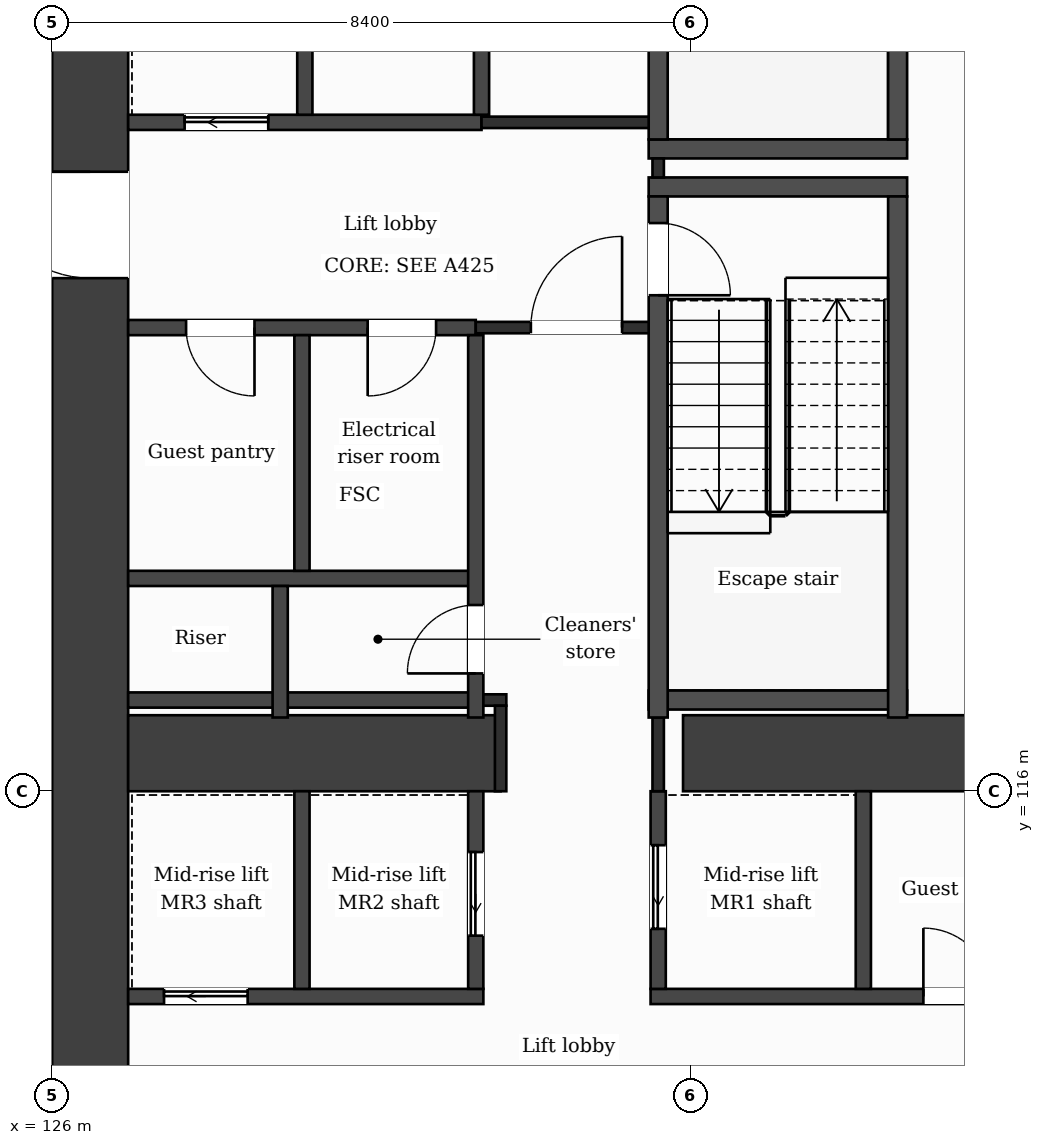
"""IFC4 building model, lengths in metres.
Left out: names, types, materials, properties, quantities, classifications, styles, units other than length and angle.
Written with IfcOpenShell. Run it as: python <this file> out.ifc"""

import sys

from ifc_helpers import new_model, si_unit, direction, frame, frame_2d, origin, place, context, subcontext, project, spatial, rectangle, extrude, element, fill, save


model = new_model("IFC4")
c1 = context("Model", 3, precision=1e-05, world=origin(), true_north=direction((0.0, 1.0)))
c2 = subcontext(c1, "Body", "Model", "MODEL_VIEW")
j1 = project(units=[si_unit("LENGTHUNIT", "METRE"), si_unit("PLANEANGLEUNIT", "RADIAN")], contexts=[c1])
p1 = place(None, origin())
s1 = spatial("IfcSite", under=j1, at=p1, CompositionType="ELEMENT")
p2 = place(p1, origin())
s2 = spatial("IfcBuilding", under=s1, at=p2, CompositionType="ELEMENT")
p3 = place(p2, frame((0.0, 0.0, 105.8)))
s3 = spatial("IfcBuildingStorey", under=s2, at=p3, CompositionType="ELEMENT", Elevation=105.8)
p4 = place(p3, frame((137.732, 131.9, 0.0), z_axis=(0.0, 0.0, 1.0), x_axis=(0.133411141623, -0.991060778808, 0.0)))
e1 = element("IfcWall", 1, at=p4, inside=s3, PredefinedType="SHEAR", context=c2, shape_type="SweptSolid", body=[
    extrude(rectangle(XDim=21.189, YDim=1.0, at=frame_2d((10.595, 0.0))), origin(), (0.0, 0.0, 1.0), 3.7),
])
p5 = place(p3, frame((126.5, 110.9, 0.0), z_axis=(0.0, 0.0, 1.0), x_axis=(0.0, 1.0, 0.0)))
e2 = element("IfcWall", 2, at=p5, inside=s3, PredefinedType="SHEAR", context=c2, shape_type="SweptSolid", body=[
    extrude(rectangle(XDim=21.0, YDim=1.0, at=frame_2d((10.5, 0.0))), origin(), (0.0, 0.0, 1.0), 3.7),
])
p6 = place(p5, frame((11.85, 0.0, 0.0)))
e3 = element("IfcOpeningElement", 3, at=p6, cuts=e2, PredefinedType="OPENING", context=c2, shape_type="SweptSolid", body=[
    extrude(rectangle(XDim=1.4, YDim=2.1, at=frame_2d((0.7, 1.05))), frame((0.0, 0.51, 0.0), z_axis=(0.0, -1.0, 0.0), x_axis=(1.0, 0.0, 0.0)), (0.0, 0.0, 1.0), 1.02),
])
p7 = place(p3, frame((127.0, 116.5, 0.0), z_axis=(0.0, 0.0, 1.0), x_axis=(1.0, 0.0, 0.0)))
e4 = element("IfcWall", 4, at=p7, inside=s3, PredefinedType="SHEAR", context=c2, shape_type="SweptSolid", body=[
    extrude(rectangle(XDim=4.9, YDim=1.0, at=frame_2d((2.45, 0.0))), origin(), (0.0, 0.0, 1.0), 3.7),
])
p8 = place(p3, frame((134.3, 116.5, 0.0), z_axis=(0.0, 0.0, 1.0), x_axis=(1.0, 0.0, 0.0)))
e5 = element("IfcWall", 5, at=p8, inside=s3, PredefinedType="SHEAR", context=c2, shape_type="SweptSolid", body=[
    extrude(rectangle(XDim=5.077, YDim=1.0, at=frame_2d((2.539, 0.0))), origin(), (0.0, 0.0, 1.0), 3.7),
])
p9 = place(p3, frame((127.0, 113.3, 0.0), z_axis=(0.0, 0.0, 1.0), x_axis=(1.0, 0.0, 0.0)))
e6 = element("IfcWall", 6, at=p9, inside=s3, PredefinedType="PARTITIONING", context=c2, shape_type="SweptSolid", body=[
    extrude(rectangle(XDim=4.673, YDim=0.2, at=frame_2d((2.336, 0.0))), origin(), (0.0, 0.0, 1.0), 3.38),
])
p10 = place(p9, frame((0.472, 0.0, 0.0)))
e7 = element("IfcOpeningElement", 7, at=p10, cuts=e6, PredefinedType="OPENING", context=c2, shape_type="SweptSolid", body=[
    extrude(rectangle(XDim=1.1, YDim=2.1, at=frame_2d((0.55, 1.05))), frame((0.0, 0.11, 0.0), z_axis=(0.0, -1.0, 0.0), x_axis=(1.0, 0.0, 0.0)), (0.0, 0.0, 1.0), 0.22),
])
p11 = place(p3, frame((133.873, 113.3, 0.0), z_axis=(0.0, 0.0, 1.0), x_axis=(1.0, 0.0, 0.0)))
e8 = element("IfcWall", 8, at=p11, inside=s3, PredefinedType="PARTITIONING", context=c2, shape_type="SweptSolid", body=[
    extrude(rectangle(XDim=5.888, YDim=0.2, at=frame_2d((2.944, 0.0))), origin(), (0.0, 0.0, 1.0), 3.38),
])
p12 = place(p11, frame((3.589, 0.0, 0.0)))
e9 = element("IfcOpeningElement", 9, at=p12, cuts=e8, PredefinedType="OPENING", context=c2, shape_type="SweptSolid", body=[
    extrude(rectangle(XDim=0.9, YDim=2.1, at=frame_2d((0.45, 1.05))), frame((0.0, 0.11, 0.0), z_axis=(0.0, -1.0, 0.0), x_axis=(1.0, 0.0, 0.0)), (0.0, 0.0, 1.0), 0.22),
])
p13 = place(p3, frame((127.0, 117.2, 0.0), z_axis=(0.0, 0.0, 1.0), x_axis=(1.0, 0.0, 0.0)))
e10 = element("IfcWall", 10, at=p13, inside=s3, PredefinedType="PARTITIONING", context=c2, shape_type="SweptSolid", body=[
    extrude(rectangle(XDim=4.573, YDim=0.2, at=frame_2d((2.287, 0.0))), origin(), (0.0, 0.0, 1.0), 3.38),
])
p14 = place(p3, frame((131.573, 117.2, 0.0), z_axis=(0.0, 0.0, 1.0), x_axis=(1.0, 0.0, 0.0)))
e11 = element("IfcWall", 11, at=p14, inside=s3, PredefinedType="PARTITIONING", context=c2, shape_type="SweptSolid", body=[
    extrude(rectangle(XDim=0.402, YDim=0.15, at=frame_2d((0.201, 0.0))), origin(), (0.0, 0.0, 1.0), 3.38),
])
p15 = place(p3, frame((133.848, 117.2, 0.0), z_axis=(0.0, 0.0, 1.0), x_axis=(1.0, 0.0, 0.0)))
e12 = element("IfcWall", 12, at=p15, inside=s3, PredefinedType="PARTITIONING", context=c2, shape_type="SweptSolid", body=[
    extrude(rectangle(XDim=3.4, YDim=0.25, at=frame_2d((1.7, 0.0))), origin(), (0.0, 0.0, 1.0), 3.38),
])
p16 = place(p3, frame((127.0, 118.8, 0.0), z_axis=(0.0, 0.0, 1.0), x_axis=(1.0, 0.0, 0.0)))
e13 = element("IfcWall", 13, at=p16, inside=s3, PredefinedType="PARTITIONING", context=c2, shape_type="SweptSolid", body=[
    extrude(rectangle(XDim=4.573, YDim=0.2, at=frame_2d((2.287, 0.0))), origin(), (0.0, 0.0, 1.0), 3.38),
])
p17 = place(p3, frame((127.0, 122.1, 0.0), z_axis=(0.0, 0.0, 1.0), x_axis=(1.0, 0.0, 0.0)))
e14 = element("IfcWall", 14, at=p17, inside=s3, PredefinedType="PARTITIONING", context=c2, shape_type="SweptSolid", body=[
    extrude(rectangle(XDim=4.573, YDim=0.2, at=frame_2d((2.287, 0.0))), origin(), (0.0, 0.0, 1.0), 3.38),
])
p18 = place(p17, frame((3.151, 0.0, 0.0)))
e15 = element("IfcOpeningElement", 15, at=p18, cuts=e14, PredefinedType="OPENING", context=c2, shape_type="SweptSolid", body=[
    extrude(rectangle(XDim=0.9, YDim=2.1, at=frame_2d((0.45, 1.05))), frame((0.0, 0.11, 0.0), z_axis=(0.0, -1.0, 0.0), x_axis=(1.0, 0.0, 0.0)), (0.0, 0.0, 1.0), 0.22),
])
p19 = place(p17, frame((0.762, 0.0, 0.0)))
e16 = element("IfcOpeningElement", 16, at=p19, cuts=e14, PredefinedType="OPENING", context=c2, shape_type="SweptSolid", body=[
    extrude(rectangle(XDim=0.9, YDim=2.1, at=frame_2d((0.45, 1.05))), frame((0.0, 0.11, 0.0), z_axis=(0.0, -1.0, 0.0), x_axis=(1.0, 0.0, 0.0)), (0.0, 0.0, 1.0), 0.22),
])
p20 = place(p3, frame((131.573, 122.1, 0.0), z_axis=(0.0, 0.0, 1.0), x_axis=(1.0, 0.0, 0.0)))
e17 = element("IfcWall", 17, at=p20, inside=s3, PredefinedType="PARTITIONING", context=c2, shape_type="SweptSolid", body=[
    extrude(rectangle(XDim=2.4, YDim=0.15, at=frame_2d((1.2, 0.0))), origin(), (0.0, 0.0, 1.0), 3.38),
])
p21 = place(p20, frame((0.725, 0.0, 0.0)))
e18 = element("IfcOpeningElement", 18, at=p21, cuts=e17, PredefinedType="OPENING", context=c2, shape_type="SweptSolid", body=[
    extrude(rectangle(XDim=1.2, YDim=2.1, at=frame_2d((0.6, 1.05))), frame((0.0, 0.085, 0.0), z_axis=(0.0, -1.0, 0.0), x_axis=(1.0, 0.0, 0.0)), (0.0, 0.0, 1.0), 0.17),
])
p22 = place(p3, frame((100.8, 122.45, 0.0), z_axis=(0.0, 0.0, 1.0), x_axis=(1.0, 0.0, 0.0)))
e19 = element("IfcWall", 19, at=p22, inside=s3, PredefinedType="PARTITIONING", context=c2, shape_type="SweptSolid", body=[
    extrude(rectangle(XDim=25.2, YDim=0.15, at=frame_2d((12.6, 0.0))), origin(), (0.0, 0.0, 1.0), 3.38),
])
for number, where, z_axis, x_axis in (
    (20, (133.848, 123.95, 0.0), (0.0, 0.0, 1.0), (1.0, 0.0, 0.0)),
    (21, (133.848, 124.45, 0.0), (0.0, 0.0, 1.0), (1.0, 0.0, 0.0)),
):
    element("IfcWall", number, at=place(p3, frame(where, z_axis=z_axis, x_axis=x_axis)), inside=s3, PredefinedType="PARTITIONING", context=c2, shape_type="SweptSolid", body=[
        extrude(rectangle(XDim=3.4, YDim=0.25, at=frame_2d((1.7, 0.0))), origin(), (0.0, 0.0, 1.0), 3.38),
    ])
p23 = place(p3, frame((100.8, 124.45, 0.0), z_axis=(0.0, 0.0, 1.0), x_axis=(1.0, 0.0, 0.0)))
e22 = element("IfcWall", 22, at=p23, inside=s3, PredefinedType="PARTITIONING", context=c2, shape_type="SweptSolid", body=[
    extrude(rectangle(XDim=25.2, YDim=0.15, at=frame_2d((12.6, 0.0))), origin(), (0.0, 0.0, 1.0), 3.38),
])
p24 = place(p23, frame((1.85, 0.0, 0.0)))
e23 = element("IfcOpeningElement", 23, at=p24, cuts=e22, PredefinedType="OPENING", context=c2, shape_type="SweptSolid", body=[
    extrude(rectangle(XDim=1.0, YDim=2.1, at=frame_2d((0.5, 1.05))), frame((0.0, 0.085, 0.0), z_axis=(0.0, -1.0, 0.0), x_axis=(1.0, 0.0, 0.0)), (0.0, 0.0, 1.0), 0.17),
])
p25 = place(p23, frame((6.425, 0.0, 0.0)))
e24 = element("IfcOpeningElement", 24, at=p25, cuts=e22, PredefinedType="OPENING", context=c2, shape_type="SweptSolid", body=[
    extrude(rectangle(XDim=1.0, YDim=2.1, at=frame_2d((0.5, 1.05))), frame((0.0, 0.085, 0.0), z_axis=(0.0, -1.0, 0.0), x_axis=(1.0, 0.0, 0.0)), (0.0, 0.0, 1.0), 0.17),
])
p26 = place(p23, frame((10.0, 0.0, 0.0)))
e25 = element("IfcOpeningElement", 25, at=p26, cuts=e22, PredefinedType="OPENING", context=c2, shape_type="SweptSolid", body=[
    extrude(rectangle(XDim=1.0, YDim=2.1, at=frame_2d((0.5, 1.05))), frame((0.0, 0.085, 0.0), z_axis=(0.0, -1.0, 0.0), x_axis=(1.0, 0.0, 0.0)), (0.0, 0.0, 1.0), 0.17),
])
p27 = place(p23, frame((14.2, 0.0, 0.0)))
e26 = element("IfcOpeningElement", 26, at=p27, cuts=e22, PredefinedType="OPENING", context=c2, shape_type="SweptSolid", body=[
    extrude(rectangle(XDim=1.0, YDim=2.1, at=frame_2d((0.5, 1.05))), frame((0.0, 0.085, 0.0), z_axis=(0.0, -1.0, 0.0), x_axis=(1.0, 0.0, 0.0)), (0.0, 0.0, 1.0), 0.17),
])
p28 = place(p23, frame((17.8, 0.0, 0.0)))
e27 = element("IfcOpeningElement", 27, at=p28, cuts=e22, PredefinedType="OPENING", context=c2, shape_type="SweptSolid", body=[
    extrude(rectangle(XDim=1.0, YDim=2.1, at=frame_2d((0.5, 1.05))), frame((0.0, 0.085, 0.0), z_axis=(0.0, -1.0, 0.0), x_axis=(1.0, 0.0, 0.0)), (0.0, 0.0, 1.0), 0.17),
])
p29 = place(p23, frame((22.85, 0.0, 0.0)))
e28 = element("IfcOpeningElement", 28, at=p29, cuts=e22, PredefinedType="OPENING", context=c2, shape_type="SweptSolid", body=[
    extrude(rectangle(XDim=1.0, YDim=2.1, at=frame_2d((0.5, 1.05))), frame((0.0, 0.085, 0.0), z_axis=(0.0, -1.0, 0.0), x_axis=(1.0, 0.0, 0.0)), (0.0, 0.0, 1.0), 0.17),
])
p30 = place(p3, frame((127.0, 124.8, 0.0), z_axis=(0.0, 0.0, 1.0), x_axis=(1.0, 0.0, 0.0)))
e29 = element("IfcWall", 29, at=p30, inside=s3, PredefinedType="PARTITIONING", context=c2, shape_type="SweptSolid", body=[
    extrude(rectangle(XDim=4.649, YDim=0.2, at=frame_2d((2.324, 0.0))), origin(), (0.0, 0.0, 1.0), 3.38),
])
p31 = place(p30, frame((0.743, 0.0, 0.0)))
e30 = element("IfcOpeningElement", 30, at=p31, cuts=e29, PredefinedType="OPENING", context=c2, shape_type="SweptSolid", body=[
    extrude(rectangle(XDim=1.1, YDim=2.1, at=frame_2d((0.55, 1.05))), frame((0.0, 0.11, 0.0), z_axis=(0.0, -1.0, 0.0), x_axis=(1.0, 0.0, 0.0)), (0.0, 0.0, 1.0), 0.22),
])
p32 = place(p3, frame((131.649, 124.8, 0.0), z_axis=(0.0, 0.0, 1.0), x_axis=(1.0, 0.0, 0.0)))
e31 = element("IfcWall", 31, at=p32, inside=s3, PredefinedType="PARTITIONING", context=c2, shape_type="SweptSolid", body=[
    extrude(rectangle(XDim=2.449, YDim=0.15, at=frame_2d((1.225, 0.0))), origin(), (0.0, 0.0, 1.0), 3.38),
])
p33 = place(p3, frame((129.0, 116.97, 0.0), z_axis=(0.0, 0.0, 1.0), x_axis=(0.0, 1.0, 0.0)))
e32 = element("IfcWall", 32, at=p33, inside=s3, PredefinedType="PARTITIONING", context=c2, shape_type="SweptSolid", body=[
    extrude(rectangle(XDim=1.73, YDim=0.2, at=frame_2d((0.865, 0.0))), origin(), (0.0, 0.0, 1.0), 3.38),
])
p34 = place(p3, frame((129.287, 113.4, 0.0), z_axis=(0.0, 0.0, 1.0), x_axis=(0.0, 1.0, 0.0)))
e33 = element("IfcWall", 33, at=p34, inside=s3, PredefinedType="PARTITIONING", context=c2, shape_type="SweptSolid", body=[
    extrude(rectangle(XDim=2.6, YDim=0.2, at=frame_2d((1.3, 0.0))), origin(), (0.0, 0.0, 1.0), 3.38),
])
for number, where, z_axis, x_axis in (
    (34, (129.287, 118.9, 0.0), (0.0, 0.0, 1.0), (0.0, 1.0, 0.0)),
    (35, (129.324, 124.9, 0.0), (0.0, 0.0, 1.0), (0.0, 1.0, 0.0)),
):
    element("IfcWall", number, at=place(p3, frame(where, z_axis=z_axis, x_axis=x_axis)), inside=s3, PredefinedType="PARTITIONING", context=c2, shape_type="SweptSolid", body=[
        extrude(rectangle(XDim=3.1, YDim=0.2, at=frame_2d((1.55, 0.0))), origin(), (0.0, 0.0, 1.0), 3.38),
    ])
p35 = place(p3, frame((131.573, 113.4, 0.0), z_axis=(0.0, 0.0, 1.0), x_axis=(0.0, 1.0, 0.0)))
e36 = element("IfcWall", 36, at=p35, inside=s3, PredefinedType="PARTITIONING", context=c2, shape_type="SweptSolid", body=[
    extrude(rectangle(XDim=2.6, YDim=0.2, at=frame_2d((1.3, 0.0))), origin(), (0.0, 0.0, 1.0), 3.38),
])
p36 = place(p35, frame((0.7, 0.0, 0.0)))
e37 = element("IfcOpeningElement", 37, at=p36, cuts=e36, PredefinedType="OPENING", context=c2, shape_type="SweptSolid", body=[
    extrude(rectangle(XDim=1.1, YDim=2.1, at=frame_2d((0.55, 1.05))), frame((0.0, 0.11, 0.0), z_axis=(0.0, -1.0, 0.0), x_axis=(1.0, 0.0, 0.0)), (0.0, 0.0, 1.0), 0.22),
])
p37 = place(p3, frame((131.573, 116.97, 0.0), z_axis=(0.0, 0.0, 1.0), x_axis=(0.0, 1.0, 0.0)))
e38 = element("IfcWall", 38, at=p37, inside=s3, PredefinedType="PARTITIONING", context=c2, shape_type="SweptSolid", body=[
    extrude(rectangle(XDim=5.03, YDim=0.2, at=frame_2d((2.515, 0.0))), origin(), (0.0, 0.0, 1.0), 3.38),
])
p38 = place(p37, frame((0.58, 0.0, 0.0)))
e39 = element("IfcOpeningElement", 39, at=p38, cuts=e38, PredefinedType="OPENING", context=c2, shape_type="SweptSolid", body=[
    extrude(rectangle(XDim=0.9, YDim=2.1, at=frame_2d((0.45, 1.05))), frame((0.0, 0.11, 0.0), z_axis=(0.0, -1.0, 0.0), x_axis=(1.0, 0.0, 0.0)), (0.0, 0.0, 1.0), 0.22),
])
p39 = place(p3, frame((131.649, 124.9, 0.0), z_axis=(0.0, 0.0, 1.0), x_axis=(0.0, 1.0, 0.0)))
e40 = element("IfcWall", 40, at=p39, inside=s3, PredefinedType="PARTITIONING", context=c2, shape_type="SweptSolid", body=[
    extrude(rectangle(XDim=3.1, YDim=0.2, at=frame_2d((1.55, 0.0))), origin(), (0.0, 0.0, 1.0), 3.38),
])
p40 = place(p3, frame((131.9, 116.0, 0.0), z_axis=(0.0, 0.0, 1.0), x_axis=(0.0, 1.0, 0.0)))
e41 = element("IfcWall", 41, at=p40, inside=s3, PredefinedType="PARTITIONING", context=c2, shape_type="SweptSolid", body=[
    extrude(rectangle(XDim=1.125, YDim=0.15, at=frame_2d((0.562, 0.0))), origin(), (0.0, 0.0, 1.0), 3.38),
])
p41 = place(p3, frame((133.973, 113.4, 0.0), z_axis=(0.0, 0.0, 1.0), x_axis=(0.0, 1.0, 0.0)))
e42 = element("IfcWall", 42, at=p41, inside=s3, PredefinedType="PARTITIONING", context=c2, shape_type="SweptSolid", body=[
    extrude(rectangle(XDim=2.6, YDim=0.2, at=frame_2d((1.3, 0.0))), origin(), (0.0, 0.0, 1.0), 3.38),
])
p42 = place(p41, frame((0.79, 0.0, 0.0)))
e43 = element("IfcOpeningElement", 43, at=p42, cuts=e42, PredefinedType="OPENING", context=c2, shape_type="SweptSolid", body=[
    extrude(rectangle(XDim=1.1, YDim=2.1, at=frame_2d((0.55, 1.05))), frame((0.0, 0.11, 0.0), z_axis=(0.0, -1.0, 0.0), x_axis=(1.0, 0.0, 0.0)), (0.0, 0.0, 1.0), 0.22),
])
p43 = place(p3, frame((133.973, 116.0, 0.0), z_axis=(0.0, 0.0, 1.0), x_axis=(0.0, 1.0, 0.0)))
e44 = element("IfcWall", 44, at=p43, inside=s3, PredefinedType="PARTITIONING", context=c2, shape_type="SweptSolid", body=[
    extrude(rectangle(XDim=0.97, YDim=0.15, at=frame_2d((0.485, 0.0))), origin(), (0.0, 0.0, 1.0), 3.38),
])
p44 = place(p3, frame((133.973, 124.075, 0.0), z_axis=(0.0, 0.0, 1.0), x_axis=(0.0, 1.0, 0.0)))
e45 = element("IfcWall", 45, at=p44, inside=s3, PredefinedType="PARTITIONING", context=c2, shape_type="SweptSolid", body=[
    extrude(rectangle(XDim=0.25, YDim=0.15, at=frame_2d((0.125, 0.0))), origin(), (0.0, 0.0, 1.0), 3.38),
])
p45 = place(p3, frame((133.973, 116.97, 0.0), z_axis=(0.0, 0.0, 1.0), x_axis=(0.0, 1.0, 0.0)))
e46 = element("IfcWall", 46, at=p45, inside=s3, PredefinedType="PARTITIONING", context=c2, shape_type="SweptSolid", body=[
    extrude(rectangle(XDim=6.855, YDim=0.25, at=frame_2d((3.427, 0.0))), origin(), (0.0, 0.0, 1.0), 3.38),
])
p46 = place(p45, frame((5.555, 0.0, 0.0)))
e47 = element("IfcOpeningElement", 47, at=p46, cuts=e46, PredefinedType="OPENING", context=c2, shape_type="SweptSolid", body=[
    extrude(rectangle(XDim=0.95, YDim=2.1, at=frame_2d((0.475, 1.05))), frame((0.0, 0.135, 0.0), z_axis=(0.0, -1.0, 0.0), x_axis=(1.0, 0.0, 0.0)), (0.0, 0.0, 1.0), 0.27),
])
p47 = place(p3, frame((133.973, 124.575, 0.0), z_axis=(0.0, 0.0, 1.0), x_axis=(0.0, 1.0, 0.0)))
e48 = element("IfcWall", 48, at=p47, inside=s3, PredefinedType="PARTITIONING", context=c2, shape_type="SweptSolid", body=[
    extrude(rectangle(XDim=6.855, YDim=0.25, at=frame_2d((3.427, 0.0))), origin(), (0.0, 0.0, 1.0), 3.38),
])
p48 = place(p47, frame((5.325, 0.0, 0.0)))
e49 = element("IfcOpeningElement", 49, at=p48, cuts=e48, PredefinedType="OPENING", context=c2, shape_type="SweptSolid", body=[
    extrude(rectangle(XDim=1.0, YDim=2.1, at=frame_2d((0.5, 1.05))), frame((0.0, 0.135, 0.0), z_axis=(0.0, -1.0, 0.0), x_axis=(1.0, 0.0, 0.0)), (0.0, 0.0, 1.0), 0.27),
])
p49 = place(p3, frame((136.672, 113.4, 0.0), z_axis=(0.0, 0.0, 1.0), x_axis=(0.0, 1.0, 0.0)))
e50 = element("IfcWall", 50, at=p49, inside=s3, PredefinedType="PARTITIONING", context=c2, shape_type="SweptSolid", body=[
    extrude(rectangle(XDim=2.6, YDim=0.2, at=frame_2d((1.3, 0.0))), origin(), (0.0, 0.0, 1.0), 3.38),
])
for number, where, z_axis, x_axis in (
    (51, (137.123, 116.97, 0.0), (0.0, 0.0, 1.0), (0.0, 1.0, 0.0)),
    (52, (137.123, 124.575, 0.0), (0.0, 0.0, 1.0), (0.0, 1.0, 0.0)),
):
    element("IfcWall", number, at=place(p3, frame(where, z_axis=z_axis, x_axis=x_axis)), inside=s3, PredefinedType="PARTITIONING", context=c2, shape_type="SweptSolid", body=[
        extrude(rectangle(XDim=6.855, YDim=0.25, at=frame_2d((3.427, 0.0))), origin(), (0.0, 0.0, 1.0), 3.38),
    ])
p50 = place(p21, origin())
e53 = element("IfcDoor", 53, at=p50, inside=s3, OperationType="SINGLE_SWING_RIGHT", PredefinedType="DOOR", context=c2, shape_type="SweptSolid", body=[
    extrude(rectangle(XDim=1.2, YDim=2.1, at=frame_2d((0.6, 1.05))), frame((0.0, 0.025, 0.0), z_axis=(0.0, -1.0, 0.0), x_axis=(1.0, 0.0, 0.0)), (0.0, 0.0, 1.0), 0.05),
])
fill(e18, e53)
p51 = place(p31, origin())
e54 = element("IfcDoor", 54, at=p51, inside=s3, OperationType="SLIDING_TO_LEFT", PredefinedType="DOOR", context=c2, shape_type="SweptSolid", body=[
    extrude(rectangle(XDim=1.1, YDim=2.1, at=frame_2d((0.55, 1.05))), frame((0.0, 0.025, 0.0), z_axis=(0.0, -1.0, 0.0), x_axis=(1.0, 0.0, 0.0)), (0.0, 0.0, 1.0), 0.05),
])
fill(e30, e54)
p52 = place(p18, origin())
e55 = element("IfcDoor", 55, at=p52, inside=s3, OperationType="SINGLE_SWING_LEFT", PredefinedType="DOOR", context=c2, shape_type="SweptSolid", body=[
    extrude(rectangle(XDim=0.9, YDim=2.1, at=frame_2d((0.45, 1.05))), frame((0.0, 0.025, 0.0), z_axis=(0.0, -1.0, 0.0), x_axis=(1.0, 0.0, 0.0)), (0.0, 0.0, 1.0), 0.05),
])
fill(e15, e55)
p53 = place(p19, origin())
e56 = element("IfcDoor", 56, at=p53, inside=s3, OperationType="SINGLE_SWING_RIGHT", PredefinedType="DOOR", context=c2, shape_type="SweptSolid", body=[
    extrude(rectangle(XDim=0.9, YDim=2.1, at=frame_2d((0.45, 1.05))), frame((0.0, 0.025, 0.0), z_axis=(0.0, -1.0, 0.0), x_axis=(1.0, 0.0, 0.0)), (0.0, 0.0, 1.0), 0.05),
])
fill(e16, e56)
p54 = place(p46, origin())
e57 = element("IfcDoor", 57, at=p54, inside=s3, OperationType="SINGLE_SWING_LEFT", PredefinedType="DOOR", context=c2, shape_type="SweptSolid", body=[
    extrude(rectangle(XDim=0.95, YDim=2.1, at=frame_2d((0.475, 1.05))), frame((0.0, 0.025, 0.0), z_axis=(0.0, -1.0, 0.0), x_axis=(1.0, 0.0, 0.0)), (0.0, 0.0, 1.0), 0.05),
])
fill(e47, e57)
p55 = place(p38, origin())
e58 = element("IfcDoor", 58, at=p55, inside=s3, OperationType="SINGLE_SWING_LEFT", PredefinedType="DOOR", context=c2, shape_type="SweptSolid", body=[
    extrude(rectangle(XDim=0.9, YDim=2.1, at=frame_2d((0.45, 1.05))), frame((0.0, 0.025, 0.0), z_axis=(0.0, -1.0, 0.0), x_axis=(1.0, 0.0, 0.0)), (0.0, 0.0, 1.0), 0.05),
])
fill(e39, e58)
p56 = place(p42, origin())
e59 = element("IfcDoor", 59, at=p56, inside=s3, OperationType="SLIDING_TO_LEFT", PredefinedType="DOOR", context=c2, shape_type="SweptSolid", body=[
    extrude(rectangle(XDim=1.1, YDim=2.1, at=frame_2d((0.55, 1.05))), frame((0.0, 0.025, 0.0), z_axis=(0.0, -1.0, 0.0), x_axis=(1.0, 0.0, 0.0)), (0.0, 0.0, 1.0), 0.05),
])
fill(e43, e59)
p57 = place(p36, origin())
e60 = element("IfcDoor", 60, at=p57, inside=s3, OperationType="SLIDING_TO_LEFT", PredefinedType="DOOR", context=c2, shape_type="SweptSolid", body=[
    extrude(rectangle(XDim=1.1, YDim=2.1, at=frame_2d((0.55, 1.05))), frame((0.0, 0.025, 0.0), z_axis=(0.0, -1.0, 0.0), x_axis=(1.0, 0.0, 0.0)), (0.0, 0.0, 1.0), 0.05),
])
fill(e37, e60)
p58 = place(p10, origin())
e61 = element("IfcDoor", 61, at=p58, inside=s3, OperationType="SLIDING_TO_LEFT", PredefinedType="DOOR", context=c2, shape_type="SweptSolid", body=[
    extrude(rectangle(XDim=1.1, YDim=2.1, at=frame_2d((0.55, 1.05))), frame((0.0, 0.025, 0.0), z_axis=(0.0, -1.0, 0.0), x_axis=(1.0, 0.0, 0.0)), (0.0, 0.0, 1.0), 0.05),
])
fill(e7, e61)
p59 = place(p12, origin())
e62 = element("IfcDoor", 62, at=p59, inside=s3, OperationType="SINGLE_SWING_LEFT", PredefinedType="DOOR", context=c2, shape_type="SweptSolid", body=[
    extrude(rectangle(XDim=0.9, YDim=2.1, at=frame_2d((0.45, 1.05))), frame((0.0, 0.025, 0.0), z_axis=(0.0, -1.0, 0.0), x_axis=(1.0, 0.0, 0.0)), (0.0, 0.0, 1.0), 0.05),
])
fill(e9, e62)
p60 = place(p6, origin())
e63 = element("IfcDoor", 63, at=p60, inside=s3, OperationType="SINGLE_SWING_RIGHT", PredefinedType="DOOR", context=c2, shape_type="SweptSolid", body=[
    extrude(rectangle(XDim=1.4, YDim=2.1, at=frame_2d((0.7, 1.05))), frame((0.0, 0.025, 0.0), z_axis=(0.0, -1.0, 0.0), x_axis=(1.0, 0.0, 0.0)), (0.0, 0.0, 1.0), 0.05),
])
fill(e3, e63)
save(model, sys.argv[1])
